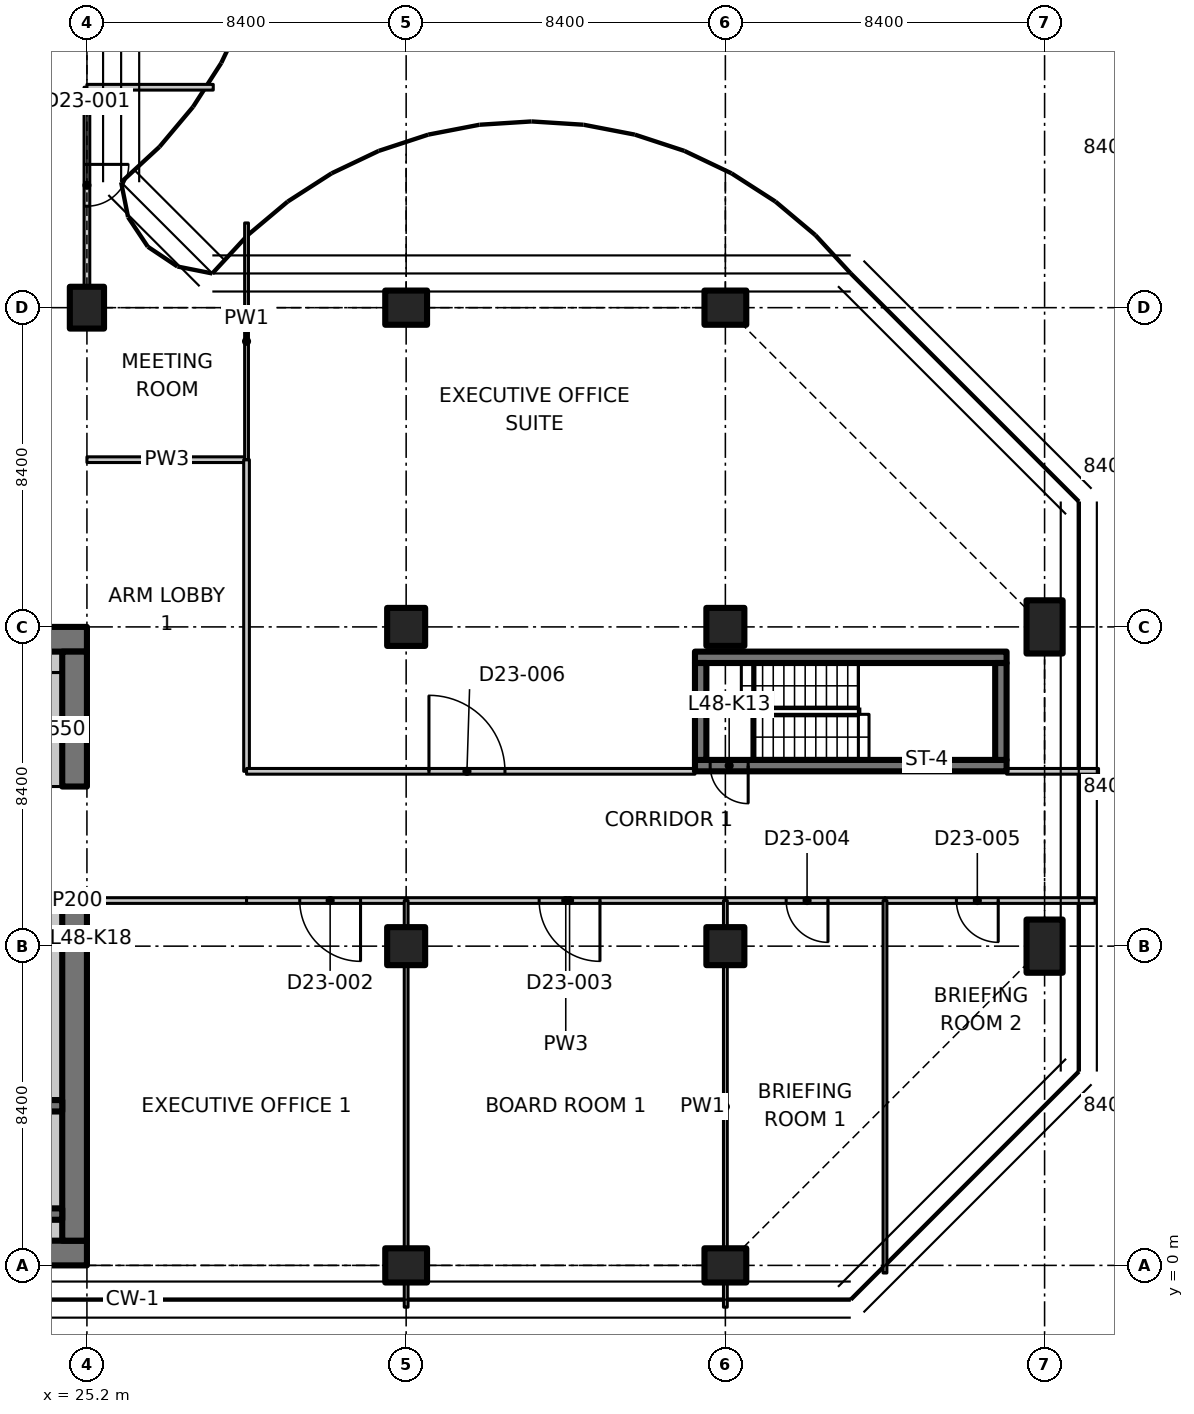
"""IFC4 building model, lengths in metres.
Left out: names, types, materials, properties, quantities, classifications, styles, units other than length and angle.
Written with IfcOpenShell. Run it as: python <this file> out.ifc"""

import sys

from ifc_helpers import new_model, si_unit, direction, frame, frame_2d, origin, origin_2d, place, context, subcontext, project, spatial, polyline, rectangle, outline, extrude, element, fill, save


model = new_model("IFC4")
c1 = context("Model", 3, precision=1e-05, world=origin(), true_north=direction((0.0, 1.0)))
c2 = subcontext(c1, "Body", "Model", "MODEL_VIEW")
j1 = project(units=[si_unit("LENGTHUNIT", "METRE"), si_unit("PLANEANGLEUNIT", "RADIAN")], contexts=[c1])
p1 = place(None, origin())
s1 = spatial("IfcSite", under=j1, at=p1, CompositionType="ELEMENT")
p2 = place(p1, origin())
s2 = spatial("IfcBuilding", under=s1, at=p2, CompositionType="ELEMENT")
p3 = place(p2, frame((0.0, 0.0, 192.0)))
s3 = spatial("IfcBuildingStorey", under=s2, at=p3, CompositionType="ELEMENT", Elevation=192.0)
for number, where, z_axis, x_axis in (
    (1, (25.2, 25.2, 0.0), (0.0, 0.0, 1.0), (1.0, 0.0, 0.0)),
    (2, (33.6, 0.0, 0.0), (0.0, 0.0, 1.0), (0.0, 1.0, 0.0)),
):
    element("IfcColumn", number, at=place(p3, frame(where, z_axis=z_axis, x_axis=x_axis)), inside=s3, PredefinedType="COLUMN", context=c2, shape_type="SweptSolid", body=[
        extrude(rectangle(XDim=0.9, YDim=1.1, at=origin_2d()), origin(), (0.0, 0.0, 1.0), 3.35),
    ])
for number, where, z_axis, x_axis in (
    (3, (33.6, 8.4, 0.0), (0.0, 0.0, 1.0), (1.0, 0.0, 0.0)),
    (4, (33.6, 16.8, 0.0), (0.0, 0.0, 1.0), (1.0, 0.0, 0.0)),
):
    element("IfcColumn", number, at=place(p3, frame(where, z_axis=z_axis, x_axis=x_axis)), inside=s3, PredefinedType="COLUMN", context=c2, shape_type="SweptSolid", body=[
        extrude(rectangle(XDim=1.0, YDim=1.0, at=origin_2d()), origin(), (0.0, 0.0, 1.0), 3.35),
    ])
for number, where, z_axis, x_axis in (
    (5, (33.6, 25.2, 0.0), (0.0, 0.0, 1.0), (0.0, 1.0, 0.0)),
    (6, (42.0, 0.0, 0.0), (0.0, 0.0, 1.0), (0.0, 1.0, 0.0)),
):
    element("IfcColumn", number, at=place(p3, frame(where, z_axis=z_axis, x_axis=x_axis)), inside=s3, PredefinedType="COLUMN", context=c2, shape_type="SweptSolid", body=[
        extrude(rectangle(XDim=0.9, YDim=1.1, at=origin_2d()), origin(), (0.0, 0.0, 1.0), 3.35),
    ])
for number, where, z_axis, x_axis in (
    (7, (42.0, 8.4, 0.0), (0.0, 0.0, 1.0), (1.0, 0.0, 0.0)),
    (8, (42.0, 16.8, 0.0), (0.0, 0.0, 1.0), (1.0, 0.0, 0.0)),
):
    element("IfcColumn", number, at=place(p3, frame(where, z_axis=z_axis, x_axis=x_axis)), inside=s3, PredefinedType="COLUMN", context=c2, shape_type="SweptSolid", body=[
        extrude(rectangle(XDim=1.0, YDim=1.0, at=origin_2d()), origin(), (0.0, 0.0, 1.0), 3.35),
    ])
p4 = place(p3, frame((42.0, 25.2, 0.0), z_axis=(0.0, 0.0, 1.0), x_axis=(0.0, 1.0, 0.0)))
e9 = element("IfcColumn", 9, at=p4, inside=s3, PredefinedType="COLUMN", context=c2, shape_type="SweptSolid", body=[
    extrude(rectangle(XDim=0.9, YDim=1.1, at=origin_2d()), origin(), (0.0, 0.0, 1.0), 3.35),
])
for number, where, z_axis, x_axis in (
    (10, (50.4, 8.4, 0.0), (0.0, 0.0, 1.0), (1.0, 0.0, 0.0)),
    (11, (50.4, 16.8, 0.0), (0.0, 0.0, 1.0), (1.0, 0.0, 0.0)),
):
    element("IfcColumn", number, at=place(p3, frame(where, z_axis=z_axis, x_axis=x_axis)), inside=s3, PredefinedType="COLUMN", context=c2, shape_type="SweptSolid", body=[
        extrude(rectangle(XDim=0.95, YDim=1.4, at=origin_2d()), origin(), (0.0, 0.0, 1.0), 3.35),
    ])
p5 = place(p3, frame((7.286, 0.325, 0.0), z_axis=(0.0, 0.0, 1.0), x_axis=(1.0, 0.0, 0.0)))
e12 = element("IfcWall", 12, at=p5, inside=s3, PredefinedType="SHEAR", context=c2, shape_type="SweptSolid", body=[
    extrude(rectangle(XDim=17.914, YDim=0.65, at=frame_2d((8.957, 0.0))), origin(), (0.0, 0.0, 1.0), 3.35),
])
p6 = place(p3, frame((23.8, 16.475, 0.0), z_axis=(0.0, 0.0, 1.0), x_axis=(1.0, 0.0, 0.0)))
e13 = element("IfcWall", 13, at=p6, inside=s3, PredefinedType="SHEAR", context=c2, shape_type="SweptSolid", body=[
    extrude(rectangle(XDim=1.4, YDim=0.65, at=frame_2d((0.7, 0.0))), origin(), (0.0, 0.0, 1.0), 3.35),
])
p7 = place(p3, frame((24.875, 0.65, 0.0), z_axis=(0.0, 0.0, 1.0), x_axis=(0.0, 1.0, 0.0)))
e14 = element("IfcWall", 14, at=p7, inside=s3, PredefinedType="SHEAR", context=c2, shape_type="SweptSolid", body=[
    extrude(rectangle(XDim=9.15, YDim=0.65, at=frame_2d((4.575, 0.0))), origin(), (0.0, 0.0, 1.0), 3.35),
])
p8 = place(p3, frame((24.875, 12.6, 0.0), z_axis=(0.0, 0.0, 1.0), x_axis=(0.0, 1.0, 0.0)))
e15 = element("IfcWall", 15, at=p8, inside=s3, PredefinedType="SHEAR", context=c2, shape_type="SweptSolid", body=[
    extrude(rectangle(XDim=3.55, YDim=0.65, at=frame_2d((1.775, 0.0))), origin(), (0.0, 0.0, 1.0), 3.35),
])
p9 = place(p3, frame((24.275, 12.6, 0.0), z_axis=(0.0, 0.0, 1.0), x_axis=(0.0, 1.0, 0.0)))
e16 = element("IfcWall", 16, at=p9, inside=s3, PredefinedType="PARTITIONING", context=c2, shape_type="SweptSolid", body=[
    extrude(rectangle(XDim=3.0, YDim=0.55, at=frame_2d((1.5, 0.0))), origin(), (0.0, 0.0, 1.0), 3.35),
])
p10 = place(p3, frame((23.8, 15.875, 0.0), z_axis=(0.0, 0.0, 1.0), x_axis=(1.0, 0.0, 0.0)))
e17 = element("IfcWall", 17, at=p10, inside=s3, PredefinedType="PARTITIONING", context=c2, shape_type="SweptSolid", body=[
    extrude(rectangle(XDim=0.75, YDim=0.55, at=frame_2d((0.375, 0.0))), origin(), (0.0, 0.0, 1.0), 3.35),
])
p11 = place(p3, frame((15.8, 1.35, 0.0), z_axis=(0.0, 0.0, 1.0), x_axis=(1.0, 0.0, 0.0)))
e18 = element("IfcWall", 18, at=p11, inside=s3, PredefinedType="SHEAR", context=c2, shape_type="SweptSolid", body=[
    extrude(rectangle(XDim=8.75, YDim=0.3, at=frame_2d((4.375, 0.0))), origin(), (0.0, 0.0, 1.0), 3.35),
])
p12 = place(p3, frame((15.8, 4.2, 0.0), z_axis=(0.0, 0.0, 1.0), x_axis=(1.0, 0.0, 0.0)))
e19 = element("IfcWall", 19, at=p12, inside=s3, PredefinedType="SHEAR", context=c2, shape_type="SweptSolid", body=[
    extrude(rectangle(XDim=8.75, YDim=0.3, at=frame_2d((4.375, 0.0))), origin(), (0.0, 0.0, 1.0), 3.35),
])
p13 = place(p12, frame((0.4, 0.0, 0.0)))
e20 = element("IfcOpeningElement", 20, at=p13, cuts=e19, PredefinedType="OPENING", context=c2, shape_type="SweptSolid", body=[
    extrude(rectangle(XDim=1.0, YDim=2.1, at=frame_2d((0.5, 1.05))), frame((0.0, 0.16, 0.0), z_axis=(0.0, -1.0, 0.0), x_axis=(1.0, 0.0, 0.0)), (0.0, 0.0, 1.0), 0.32),
])
p14 = place(p3, frame((49.4, 13.15, 0.0), z_axis=(0.0, 0.0, 1.0), x_axis=(-1.0, 0.0, 0.0)))
e21 = element("IfcWall", 21, at=p14, inside=s3, PredefinedType="SHEAR", context=c2, shape_type="SweptSolid", body=[
    extrude(rectangle(XDim=8.2, YDim=0.3, at=frame_2d((4.1, 0.0))), origin(), (0.0, 0.0, 1.0), 3.35),
])
p15 = place(p14, frame((6.8, 0.0, 0.0)))
e22 = element("IfcOpeningElement", 22, at=p15, cuts=e21, PredefinedType="OPENING", context=c2, shape_type="SweptSolid", body=[
    extrude(rectangle(XDim=1.0, YDim=2.1, at=frame_2d((0.5, 1.05))), frame((0.0, 0.16, 0.0), z_axis=(0.0, -1.0, 0.0), x_axis=(1.0, 0.0, 0.0)), (0.0, 0.0, 1.0), 0.32),
])
p16 = place(p3, frame((41.2, 16.0, 0.0), z_axis=(0.0, 0.0, 1.0), x_axis=(1.0, 0.0, 0.0)))
e23 = element("IfcWall", 23, at=p16, inside=s3, PredefinedType="SHEAR", context=c2, shape_type="SweptSolid", body=[
    extrude(rectangle(XDim=8.2, YDim=0.3, at=frame_2d((4.1, 0.0))), origin(), (0.0, 0.0, 1.0), 3.35),
])
for number, where, z_axis, x_axis in (
    (24, (41.35, 13.3, 0.0), (0.0, 0.0, 1.0), (0.0, 1.0, 0.0)),
    (25, (49.25, 13.3, 0.0), (0.0, 0.0, 1.0), (0.0, 1.0, 0.0)),
):
    element("IfcWall", number, at=place(p3, frame(where, z_axis=z_axis, x_axis=x_axis)), inside=s3, PredefinedType="SHEAR", context=c2, shape_type="SweptSolid", body=[
        extrude(rectangle(XDim=2.55, YDim=0.3, at=frame_2d((1.275, 0.0))), origin(), (0.0, 0.0, 1.0), 3.35),
    ])
p17 = place(p3, frame((13.35, 0.925, 0.0), z_axis=(0.0, 0.0, 1.0), x_axis=(1.0, 0.0, 0.0)))
e26 = element("IfcWall", 26, at=p17, inside=s3, PredefinedType="PARTITIONING", context=c2, shape_type="SweptSolid", body=[
    extrude(rectangle(XDim=11.2, YDim=0.55, at=frame_2d((5.6, 0.0))), origin(), (0.0, 0.0, 1.0), 3.35),
])
p18 = place(p3, frame((24.275, 1.5, 0.0), z_axis=(0.0, 0.0, 1.0), x_axis=(0.0, 1.0, 0.0)))
e27 = element("IfcWall", 27, at=p18, inside=s3, PredefinedType="PARTITIONING", context=c2, shape_type="SweptSolid", body=[
    extrude(rectangle(XDim=2.55, YDim=0.55, at=frame_2d((1.275, 0.0))), origin(), (0.0, 0.0, 1.0), 3.35),
])
p19 = place(p3, frame((24.275, 4.35, 0.0), z_axis=(0.0, 0.0, 1.0), x_axis=(0.0, 1.0, 0.0)))
e28 = element("IfcWall", 28, at=p19, inside=s3, PredefinedType="PARTITIONING", context=c2, shape_type="SweptSolid", body=[
    extrude(rectangle(XDim=5.45, YDim=0.55, at=frame_2d((2.725, 0.0))), origin(), (0.0, 0.0, 1.0), 3.35),
])
for number, where, z_axis, x_axis in (
    (29, (25.2, 21.2, 0.0), (0.0, 0.0, 1.0), (1.0, 0.0, 0.0)),
    (30, (29.4, 9.6, 0.0), (0.0, 0.0, 1.0), (-1.0, 0.0, 0.0)),
):
    element("IfcWall", number, at=place(p3, frame(where, z_axis=z_axis, x_axis=x_axis)), inside=s3, PredefinedType="PARTITIONING", context=c2, shape_type="SweptSolid", body=[
        extrude(rectangle(XDim=4.2, YDim=0.15, at=frame_2d((2.1, 0.0))), origin(), (0.0, 0.0, 1.0), 3.33),
    ])
p20 = place(p3, frame((29.4, 21.2, 0.0), z_axis=(0.0, 0.0, 1.0), x_axis=(0.0, -1.0, 0.0)))
e31 = element("IfcWall", 31, at=p20, inside=s3, PredefinedType="PARTITIONING", context=c2, shape_type="SweptSolid", body=[
    extrude(rectangle(XDim=8.2, YDim=0.15, at=frame_2d((4.1, 0.0))), origin(), (0.0, 0.0, 1.0), 3.33),
])
p21 = place(p3, frame((29.4, 27.429, 0.0), z_axis=(0.0, 0.0, 1.0), x_axis=(0.0, -1.0, 0.0)))
e32 = element("IfcWall", 32, at=p21, inside=s3, PredefinedType="PARTITIONING", context=c2, shape_type="SweptSolid", body=[
    extrude(outline(polyline([(0.0, 0.0), (6.229, 0.0), (6.229, 3.33), (2.679, 3.33), (2.677, 2.98), (1.781, 2.98), (1.779, 3.33), (0.154, 3.33), (0.0, 3.33), (0.0, 0.0)])), frame((0.0, 0.05, 0.0), z_axis=(0.0, -1.0, 0.0), x_axis=(1.0, 0.0, 0.0)), (0.0, 0.0, 1.0), 0.1),
])
p22 = place(p3, frame((25.2, 31.0, 0.0), z_axis=(0.0, 0.0, 1.0), x_axis=(0.0, -1.0, 0.0)))
e33 = element("IfcWall", 33, at=p22, inside=s3, PredefinedType="PARTITIONING", context=c2, shape_type="SweptSolid", body=[
    extrude(outline(polyline([(0.0, 0.0), (5.23, 0.0), (5.23, 2.98), (0.0, 2.98), (0.0, 0.0)])), frame((0.0, 0.075, 0.0), z_axis=(0.0, -1.0, 0.0), x_axis=(1.0, 0.0, 0.0)), (0.0, 0.0, 1.0), 0.15),
])
p23 = place(p22, frame((2.03, 0.0, 0.0)))
e34 = element("IfcOpeningElement", 34, at=p23, cuts=e33, PredefinedType="OPENING", context=c2, shape_type="SweptSolid", body=[
    extrude(rectangle(XDim=1.1, YDim=2.1, at=frame_2d((0.55, 1.05))), frame((0.0, 0.085, 0.0), z_axis=(0.0, -1.0, 0.0), x_axis=(1.0, 0.0, 0.0)), (0.0, 0.0, 1.0), 0.17),
])
p24 = place(p3, frame((25.2, 31.0, 0.0), z_axis=(0.0, 0.0, 1.0), x_axis=(1.0, 0.0, 0.0)))
e35 = element("IfcWall", 35, at=p24, inside=s3, PredefinedType="PARTITIONING", context=c2, shape_type="SweptSolid", body=[
    extrude(rectangle(XDim=3.324, YDim=0.15, at=frame_2d((1.662, 0.0))), origin(), (0.0, 0.0, 1.0), 2.98),
])
p25 = place(p3, frame((33.6, 9.6, 0.0), z_axis=(0.0, 0.0, 1.0), x_axis=(-1.0, 0.0, 0.0)))
e36 = element("IfcWall", 36, at=p25, inside=s3, PredefinedType="PARTITIONING", context=c2, shape_type="SweptSolid", body=[
    extrude(rectangle(XDim=4.2, YDim=0.15, at=frame_2d((2.1, 0.0))), origin(), (0.0, 0.0, 1.0), 3.33),
])
p26 = place(p25, frame((1.2, 0.0, 0.0)))
e37 = element("IfcOpeningElement", 37, at=p26, cuts=e36, PredefinedType="OPENING", context=c2, shape_type="SweptSolid", body=[
    extrude(rectangle(XDim=1.6, YDim=2.1, at=frame_2d((0.8, 1.05))), frame((0.0, 0.085, 0.0), z_axis=(0.0, -1.0, 0.0), x_axis=(1.0, 0.0, 0.0)), (0.0, 0.0, 1.0), 0.17),
])
p27 = place(p3, frame((42.0, 9.6, 0.0), z_axis=(0.0, 0.0, 1.0), x_axis=(-1.0, 0.0, 0.0)))
e38 = element("IfcWall", 38, at=p27, inside=s3, PredefinedType="PARTITIONING", context=c2, shape_type="SweptSolid", body=[
    extrude(rectangle(XDim=8.4, YDim=0.15, at=frame_2d((4.2, 0.0))), origin(), (0.0, 0.0, 1.0), 3.33),
])
p28 = place(p27, frame((3.3, 0.0, 0.0)))
e39 = element("IfcOpeningElement", 39, at=p28, cuts=e38, PredefinedType="OPENING", context=c2, shape_type="SweptSolid", body=[
    extrude(rectangle(XDim=1.6, YDim=2.1, at=frame_2d((0.8, 1.05))), frame((0.0, 0.085, 0.0), z_axis=(0.0, -1.0, 0.0), x_axis=(1.0, 0.0, 0.0)), (0.0, 0.0, 1.0), 0.17),
])
p29 = place(p3, frame((46.2, 9.6, 0.0), z_axis=(0.0, 0.0, 1.0), x_axis=(-1.0, 0.0, 0.0)))
e40 = element("IfcWall", 40, at=p29, inside=s3, PredefinedType="PARTITIONING", context=c2, shape_type="SweptSolid", body=[
    extrude(rectangle(XDim=4.2, YDim=0.15, at=frame_2d((2.1, 0.0))), origin(), (0.0, 0.0, 1.0), 3.33),
])
p30 = place(p29, frame((1.5, 0.0, 0.0)))
e41 = element("IfcOpeningElement", 41, at=p30, cuts=e40, PredefinedType="OPENING", context=c2, shape_type="SweptSolid", body=[
    extrude(rectangle(XDim=1.1, YDim=2.1, at=frame_2d((0.55, 1.05))), frame((0.0, 0.085, 0.0), z_axis=(0.0, -1.0, 0.0), x_axis=(1.0, 0.0, 0.0)), (0.0, 0.0, 1.0), 0.17),
])
p31 = place(p3, frame((51.73, 9.6, 0.0), z_axis=(0.0, 0.0, 1.0), x_axis=(-1.0, 0.0, 0.0)))
e42 = element("IfcWall", 42, at=p31, inside=s3, PredefinedType="PARTITIONING", context=c2, shape_type="SweptSolid", body=[
    extrude(outline(polyline([(0.0, 0.0), (5.531, 0.0), (5.531, 3.33), (1.781, 3.33), (1.779, 2.98), (0.883, 2.98), (0.881, 3.33), (0.25, 3.33), (0.0, 3.33), (0.0, 0.0)])), frame((0.0, 0.075, 0.0), z_axis=(0.0, -1.0, 0.0), x_axis=(1.0, 0.0, 0.0)), (0.0, 0.0, 1.0), 0.15),
])
p32 = place(p31, frame((2.551, 0.0, 0.0)))
e43 = element("IfcOpeningElement", 43, at=p32, cuts=e42, PredefinedType="OPENING", context=c2, shape_type="SweptSolid", body=[
    extrude(rectangle(XDim=1.1, YDim=2.1, at=frame_2d((0.55, 1.05))), frame((0.0, 0.085, 0.0), z_axis=(0.0, -1.0, 0.0), x_axis=(1.0, 0.0, 0.0)), (0.0, 0.0, 1.0), 0.17),
])
p33 = place(p3, frame((29.4, 13.0, 0.0), z_axis=(0.0, 0.0, 1.0), x_axis=(1.0, 0.0, 0.0)))
e44 = element("IfcWall", 44, at=p33, inside=s3, PredefinedType="PARTITIONING", context=c2, shape_type="SweptSolid", body=[
    extrude(rectangle(XDim=11.8, YDim=0.15, at=frame_2d((5.9, 0.0))), origin(), (0.0, 0.0, 1.0), 3.33),
])
p34 = place(p33, frame((4.8, 0.0, 0.0)))
e45 = element("IfcOpeningElement", 45, at=p34, cuts=e44, PredefinedType="OPENING", context=c2, shape_type="SweptSolid", body=[
    extrude(rectangle(XDim=2.0, YDim=2.4, at=frame_2d((1.0, 1.2))), frame((0.0, 0.085, 0.0), z_axis=(0.0, -1.0, 0.0), x_axis=(1.0, 0.0, 0.0)), (0.0, 0.0, 1.0), 0.17),
])
p35 = place(p3, frame((49.4, 13.0, 0.0), z_axis=(0.0, 0.0, 1.0), x_axis=(1.0, 0.0, 0.0)))
e46 = element("IfcWall", 46, at=p35, inside=s3, PredefinedType="PARTITIONING", context=c2, shape_type="SweptSolid", body=[
    extrude(rectangle(XDim=2.42, YDim=0.15, at=frame_2d((1.21, 0.0))), origin(), (0.0, 0.0, 1.0), 2.98),
])
p36 = place(p3, frame((33.6, 9.6, 0.0), z_axis=(0.0, 0.0, 1.0), x_axis=(0.0, -1.0, 0.0)))
e47 = element("IfcWall", 47, at=p36, inside=s3, PredefinedType="PARTITIONING", context=c2, shape_type="SweptSolid", body=[
    extrude(rectangle(XDim=0.68, YDim=0.1, at=frame_2d((0.34, 0.0))), origin(), (0.0, 0.0, 1.0), 3.33),
])
p37 = place(p3, frame((33.6, 7.88, 0.0), z_axis=(0.0, 0.0, 1.0), x_axis=(0.0, -1.0, 0.0)))
e48 = element("IfcWall", 48, at=p37, inside=s3, PredefinedType="PARTITIONING", context=c2, shape_type="SweptSolid", body=[
    extrude(rectangle(XDim=7.41, YDim=0.1, at=frame_2d((3.705, 0.0))), origin(), (0.0, 0.0, 1.0), 3.33),
])
p38 = place(p3, frame((33.6, -0.47, 0.0), z_axis=(0.0, 0.0, 1.0), x_axis=(0.0, -1.0, 0.0)))
e49 = element("IfcWall", 49, at=p38, inside=s3, PredefinedType="PARTITIONING", context=c2, shape_type="SweptSolid", body=[
    extrude(rectangle(XDim=0.63, YDim=0.1, at=frame_2d((0.315, 0.0))), origin(), (0.0, 0.0, 1.0), 3.33),
])
p39 = place(p3, frame((42.0, 9.6, 0.0), z_axis=(0.0, 0.0, 1.0), x_axis=(0.0, -1.0, 0.0)))
e50 = element("IfcWall", 50, at=p39, inside=s3, PredefinedType="PARTITIONING", context=c2, shape_type="SweptSolid", body=[
    extrude(rectangle(XDim=0.68, YDim=0.1, at=frame_2d((0.34, 0.0))), origin(), (0.0, 0.0, 1.0), 3.33),
])
p40 = place(p3, frame((42.0, 7.88, 0.0), z_axis=(0.0, 0.0, 1.0), x_axis=(0.0, -1.0, 0.0)))
e51 = element("IfcWall", 51, at=p40, inside=s3, PredefinedType="PARTITIONING", context=c2, shape_type="SweptSolid", body=[
    extrude(outline(polyline([(0.0, 0.0), (7.41, 0.0), (7.41, 2.98), (7.216, 2.98), (7.214, 3.33), (0.0, 3.33), (0.0, 0.0)])), frame((0.0, 0.05, 0.0), z_axis=(0.0, -1.0, 0.0), x_axis=(1.0, 0.0, 0.0)), (0.0, 0.0, 1.0), 0.1),
])
p41 = place(p3, frame((42.0, -0.47, 0.0), z_axis=(0.0, 0.0, 1.0), x_axis=(0.0, -1.0, 0.0)))
e52 = element("IfcWall", 52, at=p41, inside=s3, PredefinedType="PARTITIONING", context=c2, shape_type="SweptSolid", body=[
    extrude(rectangle(XDim=0.63, YDim=0.1, at=frame_2d((0.315, 0.0))), origin(), (0.0, 0.0, 1.0), 3.33),
])
p42 = place(p3, frame((46.2, 9.6, 0.0), z_axis=(0.0, 0.0, 1.0), x_axis=(0.0, -1.0, 0.0)))
e53 = element("IfcWall", 53, at=p42, inside=s3, PredefinedType="PARTITIONING", context=c2, shape_type="SweptSolid", body=[
    extrude(outline(polyline([(0.0, 0.0), (9.8, 0.0), (9.8, 3.33), (6.066, 3.33), (6.064, 2.98), (4.736, 2.98), (4.734, 3.33), (0.0, 3.33), (0.0, 0.0)])), frame((0.0, 0.05, 0.0), z_axis=(0.0, -1.0, 0.0), x_axis=(1.0, 0.0, 0.0)), (0.0, 0.0, 1.0), 0.1),
])
p43 = place(p15, origin())
e54 = element("IfcDoor", 54, at=p43, inside=s3, OperationType="SINGLE_SWING_RIGHT", PredefinedType="DOOR", context=c2, shape_type="SweptSolid", body=[
    extrude(rectangle(XDim=1.0, YDim=2.1, at=frame_2d((0.5, 1.05))), frame((0.0, 0.025, 0.0), z_axis=(0.0, -1.0, 0.0), x_axis=(1.0, 0.0, 0.0)), (0.0, 0.0, 1.0), 0.05),
])
fill(e22, e54)
p44 = place(p23, origin())
e55 = element("IfcDoor", 55, at=p44, inside=s3, OperationType="SINGLE_SWING_RIGHT", PredefinedType="DOOR", context=c2, shape_type="SweptSolid", body=[
    extrude(rectangle(XDim=1.1, YDim=2.1, at=frame_2d((0.55, 1.05))), frame((0.0, 0.025, 0.0), z_axis=(0.0, -1.0, 0.0), x_axis=(1.0, 0.0, 0.0)), (0.0, 0.0, 1.0), 0.05),
])
fill(e34, e55)
p45 = place(p26, origin())
e56 = element("IfcDoor", 56, at=p45, inside=s3, OperationType="DOUBLE_DOOR_SINGLE_SWING", PredefinedType="DOOR", context=c2, shape_type="SweptSolid", body=[
    extrude(rectangle(XDim=1.6, YDim=2.1, at=frame_2d((0.8, 1.05))), frame((0.0, 0.025, 0.0), z_axis=(0.0, -1.0, 0.0), x_axis=(1.0, 0.0, 0.0)), (0.0, 0.0, 1.0), 0.05),
])
fill(e37, e56)
p46 = place(p28, origin())
e57 = element("IfcDoor", 57, at=p46, inside=s3, OperationType="DOUBLE_DOOR_SINGLE_SWING", PredefinedType="DOOR", context=c2, shape_type="SweptSolid", body=[
    extrude(rectangle(XDim=1.6, YDim=2.1, at=frame_2d((0.8, 1.05))), frame((0.0, 0.025, 0.0), z_axis=(0.0, -1.0, 0.0), x_axis=(1.0, 0.0, 0.0)), (0.0, 0.0, 1.0), 0.05),
])
fill(e39, e57)
p47 = place(p30, origin())
e58 = element("IfcDoor", 58, at=p47, inside=s3, OperationType="SINGLE_SWING_LEFT", PredefinedType="DOOR", context=c2, shape_type="SweptSolid", body=[
    extrude(rectangle(XDim=1.1, YDim=2.1, at=frame_2d((0.55, 1.05))), frame((0.0, 0.025, 0.0), z_axis=(0.0, -1.0, 0.0), x_axis=(1.0, 0.0, 0.0)), (0.0, 0.0, 1.0), 0.05),
])
fill(e41, e58)
p48 = place(p32, origin())
e59 = element("IfcDoor", 59, at=p48, inside=s3, OperationType="SINGLE_SWING_LEFT", PredefinedType="DOOR", context=c2, shape_type="SweptSolid", body=[
    extrude(rectangle(XDim=1.1, YDim=2.1, at=frame_2d((0.55, 1.05))), frame((0.0, 0.025, 0.0), z_axis=(0.0, -1.0, 0.0), x_axis=(1.0, 0.0, 0.0)), (0.0, 0.0, 1.0), 0.05),
])
fill(e43, e59)
p49 = place(p34, origin())
e60 = element("IfcDoor", 60, at=p49, inside=s3, OperationType="DOUBLE_DOOR_SINGLE_SWING", PredefinedType="DOOR", context=c2, shape_type="SweptSolid", body=[
    extrude(rectangle(XDim=2.0, YDim=2.4, at=frame_2d((1.0, 1.2))), frame((0.0, 0.025, 0.0), z_axis=(0.0, -1.0, 0.0), x_axis=(1.0, 0.0, 0.0)), (0.0, 0.0, 1.0), 0.05),
])
fill(e45, e60)
save(model, sys.argv[1])
